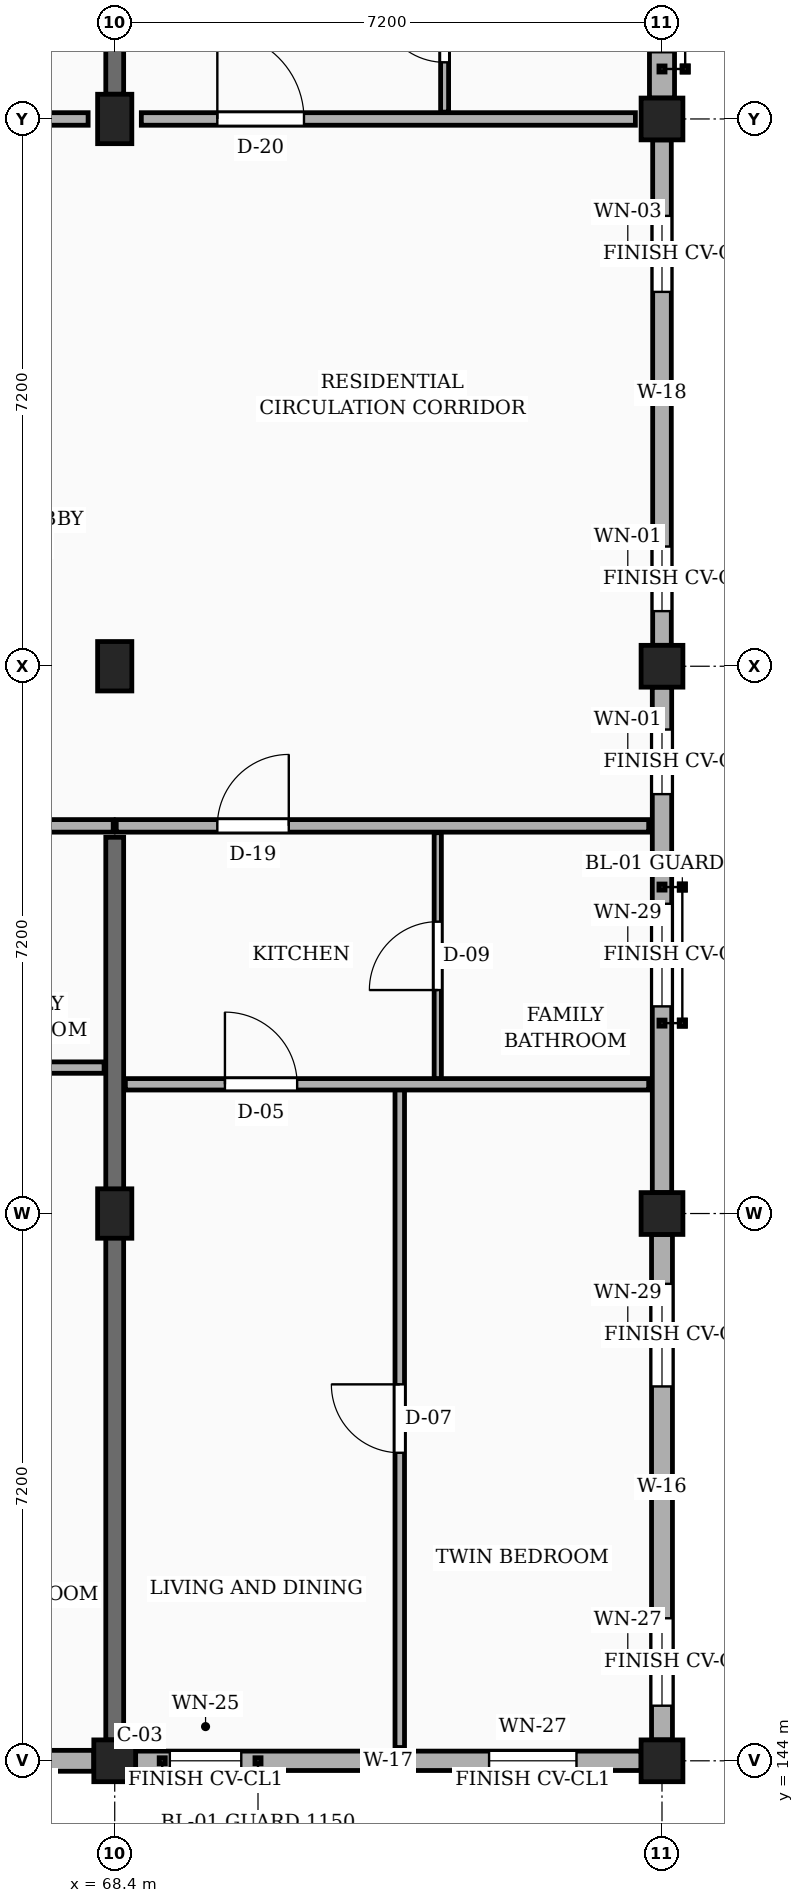
"""IFC4 building model, lengths in metres.
Left out: names, types, materials, properties, quantities, classifications, styles, units other than length and angle.
Written with IfcOpenShell. Run it as: python <this file> out.ifc"""

import sys

from ifc_helpers import new_model, si_unit, direction, frame, frame_2d, origin, origin_2d, place, context, subcontext, project, spatial, rectangle, extrude, element, fill, save


model = new_model("IFC4")
c1 = context("Model", 3, precision=1e-05, world=origin(), true_north=direction((0.0, 1.0)))
c2 = subcontext(c1, "Body", "Model", "MODEL_VIEW")
j1 = project(units=[si_unit("LENGTHUNIT", "METRE"), si_unit("PLANEANGLEUNIT", "RADIAN")], contexts=[c1])
p1 = place(None, origin())
s1 = spatial("IfcSite", under=j1, at=p1, CompositionType="ELEMENT")
p2 = place(p1, origin())
s2 = spatial("IfcBuilding", under=s1, at=p2, CompositionType="ELEMENT")
p3 = place(p2, frame((0.0, 0.0, 13.95)))
s3 = spatial("IfcBuildingStorey", under=s2, at=p3, CompositionType="ELEMENT", Elevation=13.95)
p4 = place(p3, frame((68.4, 144.0, 0.0), z_axis=(0.0, 0.0, 1.0), x_axis=(1.0, 0.0, 0.0)))
e1 = element("IfcColumn", 1, at=p4, inside=s3, PredefinedType="COLUMN", context=c2, shape_type="SweptSolid", body=[
    extrude(rectangle(XDim=0.55, YDim=0.55, at=origin_2d()), origin(), (0.0, 0.0, 1.0), 3.15),
])
for number, where, z_axis, x_axis in (
    (2, (68.4, 151.2, 0.0), (0.0, 0.0, 1.0), (1.0, 0.0, 0.0)),
    (3, (68.4, 158.4, 0.0), (0.0, 0.0, 1.0), (1.0, 0.0, 0.0)),
    (4, (68.4, 165.6, 0.0), (0.0, 0.0, 1.0), (1.0, 0.0, 0.0)),
):
    element("IfcColumn", number, at=place(p3, frame(where, z_axis=z_axis, x_axis=x_axis)), inside=s3, PredefinedType="COLUMN", context=c2, shape_type="SweptSolid", body=[
        extrude(rectangle(XDim=0.45, YDim=0.65, at=origin_2d()), origin(), (0.0, 0.0, 1.0), 3.15),
    ])
for number, where, z_axis, x_axis in (
    (5, (75.6, 144.0, 0.0), (0.0, 0.0, 1.0), (1.0, 0.0, 0.0)),
    (6, (75.6, 151.2, 0.0), (0.0, 0.0, 1.0), (1.0, 0.0, 0.0)),
    (7, (75.6, 158.4, 0.0), (0.0, 0.0, 1.0), (1.0, 0.0, 0.0)),
    (8, (75.6, 165.6, 0.0), (0.0, 0.0, 1.0), (1.0, 0.0, 0.0)),
):
    element("IfcColumn", number, at=place(p3, frame(where, z_axis=z_axis, x_axis=x_axis)), inside=s3, PredefinedType="COLUMN", context=c2, shape_type="SweptSolid", body=[
        extrude(rectangle(XDim=0.55, YDim=0.55, at=origin_2d()), origin(), (0.0, 0.0, 1.0), 3.15),
    ])
p5 = place(p3, frame((68.4, 144.275, 0.0), z_axis=(0.0, 0.0, 1.0), x_axis=(0.0, 1.0, 0.0)))
e9 = element("IfcWall", 9, at=p5, inside=s3, PredefinedType="SOLIDWALL", context=c2, shape_type="SweptSolid", body=[
    extrude(rectangle(XDim=11.875, YDim=0.235, at=frame_2d((5.938, 0.0))), origin(), (0.0, 0.0, 1.0), 2.185),
])
p6 = place(p3, frame((68.4, 165.925, 0.0), z_axis=(0.0, 0.0, 1.0), x_axis=(0.0, 1.0, 0.0)))
e10 = element("IfcWall", 10, at=p6, inside=s3, PredefinedType="SOLIDWALL", context=c2, shape_type="SweptSolid", body=[
    extrude(rectangle(XDim=6.6, YDim=0.235, at=frame_2d((3.3, 0.0))), origin(), (0.0, 0.0, 1.0), 2.185),
])
p7 = place(p3, frame((61.475, 144.0, 0.0), z_axis=(0.0, 0.0, 1.0), x_axis=(1.0, 0.0, 0.0)))
e11 = element("IfcWall", 11, at=p7, inside=s3, PredefinedType="SOLIDWALL", context=c2, shape_type="SweptSolid", body=[
    extrude(rectangle(XDim=6.65, YDim=0.275, at=frame_2d((3.325, 0.0))), origin(), (0.0, 0.0, 1.0), 2.455),
])
p8 = place(p7, frame((0.45, 0.0, 0.78)))
e12 = element("IfcOpeningElement", 12, at=p8, cuts=e11, PredefinedType="OPENING", context=c2, shape_type="SweptSolid", body=[
    extrude(rectangle(XDim=1.38, YDim=1.36, at=frame_2d((0.69, 0.68))), frame((0.0, 0.147, 0.0), z_axis=(0.0, -1.0, 0.0), x_axis=(1.0, 0.0, 0.0)), (0.0, 0.0, 1.0), 0.295),
])
p9 = place(p7, frame((4.65, 0.0, 0.78)))
e13 = element("IfcOpeningElement", 13, at=p9, cuts=e11, PredefinedType="OPENING", context=c2, shape_type="SweptSolid", body=[
    extrude(rectangle(XDim=0.94, YDim=1.44, at=frame_2d((0.47, 0.72))), frame((0.0, 0.147, 0.0), z_axis=(0.0, -1.0, 0.0), x_axis=(1.0, 0.0, 0.0)), (0.0, 0.0, 1.0), 0.295),
])
p10 = place(p3, frame((68.675, 144.0, 0.0), z_axis=(0.0, 0.0, 1.0), x_axis=(1.0, 0.0, 0.0)))
e14 = element("IfcWall", 14, at=p10, inside=s3, PredefinedType="SOLIDWALL", context=c2, shape_type="SweptSolid", body=[
    extrude(rectangle(XDim=6.65, YDim=0.255, at=frame_2d((3.325, 0.0))), origin(), (0.0, 0.0, 1.0), 2.455),
])
p11 = place(p10, frame((0.45, 0.0, 0.78)))
e15 = element("IfcOpeningElement", 15, at=p11, cuts=e14, PredefinedType="OPENING", context=c2, shape_type="SweptSolid", body=[
    extrude(rectangle(XDim=0.94, YDim=1.44, at=frame_2d((0.47, 0.72))), frame((0.0, 0.137, 0.0), z_axis=(0.0, -1.0, 0.0), x_axis=(1.0, 0.0, 0.0)), (0.0, 0.0, 1.0), 0.275),
])
p12 = place(p10, frame((4.65, 0.0, 0.78)))
e16 = element("IfcOpeningElement", 16, at=p12, cuts=e14, PredefinedType="OPENING", context=c2, shape_type="SweptSolid", body=[
    extrude(rectangle(XDim=1.15, YDim=1.44, at=frame_2d((0.575, 0.72))), frame((0.0, 0.137, 0.0), z_axis=(0.0, -1.0, 0.0), x_axis=(1.0, 0.0, 0.0)), (0.0, 0.0, 1.0), 0.275),
])
p13 = place(p3, frame((75.6, 144.275, 0.0), z_axis=(0.0, 0.0, 1.0), x_axis=(0.0, 1.0, 0.0)))
e17 = element("IfcWall", 17, at=p13, inside=s3, PredefinedType="SOLIDWALL", context=c2, shape_type="SweptSolid", body=[
    extrude(rectangle(XDim=6.65, YDim=0.275, at=frame_2d((3.325, 0.0))), origin(), (0.0, 0.0, 1.0), 2.455),
])
p14 = place(p13, frame((0.45, 0.0, 0.78)))
e18 = element("IfcOpeningElement", 18, at=p14, cuts=e17, PredefinedType="OPENING", context=c2, shape_type="SweptSolid", body=[
    extrude(rectangle(XDim=1.15, YDim=1.44, at=frame_2d((0.575, 0.72))), frame((0.0, 0.147, 0.0), z_axis=(0.0, -1.0, 0.0), x_axis=(1.0, 0.0, 0.0)), (0.0, 0.0, 1.0), 0.295),
])
p15 = place(p13, frame((4.65, 0.0, 0.78)))
e19 = element("IfcOpeningElement", 19, at=p15, cuts=e17, PredefinedType="OPENING", context=c2, shape_type="SweptSolid", body=[
    extrude(rectangle(XDim=1.35, YDim=1.44, at=frame_2d((0.675, 0.72))), frame((0.0, 0.147, 0.0), z_axis=(0.0, -1.0, 0.0), x_axis=(1.0, 0.0, 0.0)), (0.0, 0.0, 1.0), 0.295),
])
p16 = place(p3, frame((75.6, 151.475, 0.0), z_axis=(0.0, 0.0, 1.0), x_axis=(0.0, 1.0, 0.0)))
e20 = element("IfcWall", 20, at=p16, inside=s3, PredefinedType="SOLIDWALL", context=c2, shape_type="SweptSolid", body=[
    extrude(rectangle(XDim=6.65, YDim=0.255, at=frame_2d((3.325, 0.0))), origin(), (0.0, 0.0, 1.0), 2.455),
])
p17 = place(p16, frame((2.45, 0.0, 0.78)))
e21 = element("IfcOpeningElement", 21, at=p17, cuts=e20, PredefinedType="OPENING", context=c2, shape_type="SweptSolid", body=[
    extrude(rectangle(XDim=1.35, YDim=1.44, at=frame_2d((0.675, 0.72))), frame((0.0, 0.137, 0.0), z_axis=(0.0, -1.0, 0.0), x_axis=(1.0, 0.0, 0.0)), (0.0, 0.0, 1.0), 0.275),
])
p18 = place(p16, frame((5.242, 0.0, 0.78)))
e22 = element("IfcOpeningElement", 22, at=p18, cuts=e20, PredefinedType="OPENING", context=c2, shape_type="SweptSolid", body=[
    extrude(rectangle(XDim=0.85, YDim=1.15, at=frame_2d((0.425, 0.575))), frame((0.0, 0.137, 0.0), z_axis=(0.0, -1.0, 0.0), x_axis=(1.0, 0.0, 0.0)), (0.0, 0.0, 1.0), 0.275),
])
p19 = place(p3, frame((75.6, 158.675, 0.0), z_axis=(0.0, 0.0, 1.0), x_axis=(0.0, 1.0, 0.0)))
e23 = element("IfcWall", 23, at=p19, inside=s3, PredefinedType="SOLIDWALL", context=c2, shape_type="SweptSolid", body=[
    extrude(rectangle(XDim=6.65, YDim=0.245, at=frame_2d((3.325, 0.0))), origin(), (0.0, 0.0, 1.0), 2.455),
])
p20 = place(p19, frame((0.45, 0.0, 0.78)))
e24 = element("IfcOpeningElement", 24, at=p20, cuts=e23, PredefinedType="OPENING", context=c2, shape_type="SweptSolid", body=[
    extrude(rectangle(XDim=0.85, YDim=1.15, at=frame_2d((0.425, 0.575))), frame((0.0, 0.133, 0.0), z_axis=(0.0, -1.0, 0.0), x_axis=(1.0, 0.0, 0.0)), (0.0, 0.0, 1.0), 0.265),
])
p21 = place(p19, frame((4.65, 0.0, 0.78)))
e25 = element("IfcOpeningElement", 25, at=p21, cuts=e23, PredefinedType="OPENING", context=c2, shape_type="SweptSolid", body=[
    extrude(rectangle(XDim=1.0, YDim=1.15, at=frame_2d((0.5, 0.575))), frame((0.0, 0.133, 0.0), z_axis=(0.0, -1.0, 0.0), x_axis=(1.0, 0.0, 0.0)), (0.0, 0.0, 1.0), 0.265),
])
p22 = place(p3, frame((75.6, 165.875, 0.0), z_axis=(0.0, 0.0, 1.0), x_axis=(0.0, 1.0, 0.0)))
e26 = element("IfcWall", 26, at=p22, inside=s3, PredefinedType="SOLIDWALL", context=c2, shape_type="SweptSolid", body=[
    extrude(rectangle(XDim=6.65, YDim=0.33, at=frame_2d((3.325, 0.0))), origin(), (0.0, 0.0, 1.0), 2.455),
])
p23 = place(p22, frame((0.603, 0.0, 0.78)))
e27 = element("IfcOpeningElement", 27, at=p23, cuts=e26, PredefinedType="OPENING", context=c2, shape_type="SweptSolid", body=[
    extrude(rectangle(XDim=1.0, YDim=1.15, at=frame_2d((0.5, 0.575))), frame((0.0, 0.175, 0.0), z_axis=(0.0, -1.0, 0.0), x_axis=(1.0, 0.0, 0.0)), (0.0, 0.0, 1.0), 0.35),
])
p24 = place(p22, frame((3.708, 0.0, 0.78)))
e28 = element("IfcOpeningElement", 28, at=p24, cuts=e26, PredefinedType="OPENING", context=c2, shape_type="SweptSolid", body=[
    extrude(rectangle(XDim=1.16, YDim=1.15, at=frame_2d((0.58, 0.575))), frame((0.0, 0.175, 0.0), z_axis=(0.0, -1.0, 0.0), x_axis=(1.0, 0.0, 0.0)), (0.0, 0.0, 1.0), 0.35),
])
p25 = place(p3, frame((61.22, 156.3, 0.0), z_axis=(0.0, 0.0, 1.0), x_axis=(1.0, 0.0, 0.0)))
e29 = element("IfcWall", 29, at=p25, inside=s3, PredefinedType="PARTITIONING", context=c2, shape_type="SweptSolid", body=[
    extrude(rectangle(XDim=7.16, YDim=0.165, at=frame_2d((3.58, 0.0))), origin(), (0.0, 0.0, 1.0), 2.32),
])
p26 = place(p25, frame((1.33, 0.0, 0.0)))
e30 = element("IfcOpeningElement", 30, at=p26, cuts=e29, PredefinedType="OPENING", context=c2, shape_type="SweptSolid", body=[
    extrude(rectangle(XDim=1.0, YDim=2.15, at=frame_2d((0.5, 1.075))), frame((0.0, 0.093, 0.0), z_axis=(0.0, -1.0, 0.0), x_axis=(1.0, 0.0, 0.0)), (0.0, 0.0, 1.0), 0.185),
])
p27 = place(p3, frame((68.42, 156.3, 0.0), z_axis=(0.0, 0.0, 1.0), x_axis=(1.0, 0.0, 0.0)))
e31 = element("IfcWall", 31, at=p27, inside=s3, PredefinedType="PARTITIONING", context=c2, shape_type="SweptSolid", body=[
    extrude(rectangle(XDim=7.005, YDim=0.165, at=frame_2d((3.502, 0.0))), origin(), (0.0, 0.0, 1.0), 2.32),
])
p28 = place(p27, frame((1.33, 0.0, 0.0)))
e32 = element("IfcOpeningElement", 32, at=p28, cuts=e31, PredefinedType="OPENING", context=c2, shape_type="SweptSolid", body=[
    extrude(rectangle(XDim=0.94, YDim=2.12, at=frame_2d((0.47, 1.06))), frame((0.0, 0.093, 0.0), z_axis=(0.0, -1.0, 0.0), x_axis=(1.0, 0.0, 0.0)), (0.0, 0.0, 1.0), 0.185),
])
p29 = place(p3, frame((61.55, 165.6, 0.0), z_axis=(0.0, 0.0, 1.0), x_axis=(1.0, 0.0, 0.0)))
e33 = element("IfcWall", 33, at=p29, inside=s3, PredefinedType="PARTITIONING", context=c2, shape_type="SweptSolid", body=[
    extrude(rectangle(XDim=6.5, YDim=0.165, at=frame_2d((3.25, 0.0))), origin(), (0.0, 0.0, 1.0), 2.235),
])
p30 = place(p29, frame((1.0, 0.0, 0.0)))
e34 = element("IfcOpeningElement", 34, at=p30, cuts=e33, PredefinedType="OPENING", context=c2, shape_type="SweptSolid", body=[
    extrude(rectangle(XDim=0.94, YDim=2.12, at=frame_2d((0.47, 1.06))), frame((0.0, 0.093, 0.0), z_axis=(0.0, -1.0, 0.0), x_axis=(1.0, 0.0, 0.0)), (0.0, 0.0, 1.0), 0.185),
])
p31 = place(p3, frame((68.75, 165.6, 0.0), z_axis=(0.0, 0.0, 1.0), x_axis=(1.0, 0.0, 0.0)))
e35 = element("IfcWall", 35, at=p31, inside=s3, PredefinedType="PARTITIONING", context=c2, shape_type="SweptSolid", body=[
    extrude(rectangle(XDim=6.5, YDim=0.165, at=frame_2d((3.25, 0.0))), origin(), (0.0, 0.0, 1.0), 2.235),
])
p32 = place(p31, frame((1.0, 0.0, 0.0)))
e36 = element("IfcOpeningElement", 36, at=p32, cuts=e35, PredefinedType="OPENING", context=c2, shape_type="SweptSolid", body=[
    extrude(rectangle(XDim=1.14, YDim=2.18, at=frame_2d((0.57, 1.09))), frame((0.0, 0.093, 0.0), z_axis=(0.0, -1.0, 0.0), x_axis=(1.0, 0.0, 0.0)), (0.0, 0.0, 1.0), 0.185),
])
p33 = place(p3, frame((61.34, 153.12, 0.0), z_axis=(0.0, 0.0, 1.0), x_axis=(1.0, 0.0, 0.0)))
e37 = element("IfcWall", 37, at=p33, inside=s3, PredefinedType="PARTITIONING", context=c2, shape_type="SweptSolid", body=[
    extrude(rectangle(XDim=6.92, YDim=0.15, at=frame_2d((3.46, 0.0))), origin(), (0.0, 0.0, 1.0), 2.32),
])
p34 = place(p33, frame((1.31, 0.0, 0.0)))
e38 = element("IfcOpeningElement", 38, at=p34, cuts=e37, PredefinedType="OPENING", context=c2, shape_type="SweptSolid", body=[
    extrude(rectangle(XDim=0.92, YDim=2.1, at=frame_2d((0.46, 1.05))), frame((0.0, 0.085, 0.0), z_axis=(0.0, -1.0, 0.0), x_axis=(1.0, 0.0, 0.0)), (0.0, 0.0, 1.0), 0.17),
])
p35 = place(p3, frame((72.15, 144.175, 0.0), z_axis=(0.0, 0.0, 1.0), x_axis=(0.0, 1.0, 0.0)))
e39 = element("IfcWall", 39, at=p35, inside=s3, PredefinedType="PARTITIONING", context=c2, shape_type="SweptSolid", body=[
    extrude(rectangle(XDim=8.655, YDim=0.125, at=frame_2d((4.328, 0.0))), origin(), (0.0, 0.0, 1.0), 2.32),
])
p36 = place(p35, frame((3.877, 0.0, 0.0)))
e40 = element("IfcOpeningElement", 40, at=p36, cuts=e39, PredefinedType="OPENING", context=c2, shape_type="SweptSolid", body=[
    extrude(rectangle(XDim=0.9, YDim=2.1, at=frame_2d((0.45, 1.05))), frame((0.0, 0.073, 0.0), z_axis=(0.0, -1.0, 0.0), x_axis=(1.0, 0.0, 0.0)), (0.0, 0.0, 1.0), 0.145),
])
p37 = place(p3, frame((72.65, 152.97, 0.0), z_axis=(0.0, 0.0, 1.0), x_axis=(0.0, 1.0, 0.0)))
e41 = element("IfcWall", 41, at=p37, inside=s3, PredefinedType="PARTITIONING", context=c2, shape_type="SweptSolid", body=[
    extrude(rectangle(XDim=3.24, YDim=0.095, at=frame_2d((1.62, 0.0))), origin(), (0.0, 0.0, 1.0), 2.32),
])
p38 = place(p37, frame((1.17, 0.0, 0.0)))
e42 = element("IfcOpeningElement", 42, at=p38, cuts=e41, PredefinedType="OPENING", context=c2, shape_type="SweptSolid", body=[
    extrude(rectangle(XDim=0.9, YDim=2.05, at=frame_2d((0.45, 1.025))), frame((0.0, 0.058, 0.0), z_axis=(0.0, -1.0, 0.0), x_axis=(1.0, 0.0, 0.0)), (0.0, 0.0, 1.0), 0.115),
])
p39 = place(p3, frame((68.54, 152.9, 0.0), z_axis=(0.0, 0.0, 1.0), x_axis=(1.0, 0.0, 0.0)))
e43 = element("IfcWall", 43, at=p39, inside=s3, PredefinedType="PARTITIONING", context=c2, shape_type="SweptSolid", body=[
    extrude(rectangle(XDim=6.885, YDim=0.15, at=frame_2d((3.442, 0.0))), origin(), (0.0, 0.0, 1.0), 2.32),
])
p40 = place(p39, frame((1.31, 0.0, 0.0)))
e44 = element("IfcOpeningElement", 44, at=p40, cuts=e43, PredefinedType="OPENING", context=c2, shape_type="SweptSolid", body=[
    extrude(rectangle(XDim=0.95, YDim=2.1, at=frame_2d((0.475, 1.05))), frame((0.0, 0.085, 0.0), z_axis=(0.0, -1.0, 0.0), x_axis=(1.0, 0.0, 0.0)), (0.0, 0.0, 1.0), 0.17),
])
p41 = place(p3, frame((72.74, 165.69, 0.0), z_axis=(0.0, 0.0, 1.0), x_axis=(0.0, 1.0, 0.0)))
e45 = element("IfcWall", 45, at=p41, inside=s3, PredefinedType="PARTITIONING", context=c2, shape_type="SweptSolid", body=[
    extrude(rectangle(XDim=2.18, YDim=0.105, at=frame_2d((1.09, 0.0))), origin(), (0.0, 0.0, 1.0), 2.32),
])
p42 = place(p41, frame((0.655, 0.0, 0.0)))
e46 = element("IfcOpeningElement", 46, at=p42, cuts=e45, PredefinedType="OPENING", context=c2, shape_type="SweptSolid", body=[
    extrude(rectangle(XDim=0.87, YDim=2.05, at=frame_2d((0.435, 1.025))), frame((0.0, 0.062, 0.0), z_axis=(0.0, -1.0, 0.0), x_axis=(1.0, 0.0, 0.0)), (0.0, 0.0, 1.0), 0.125),
])
p43 = place(p11, origin())
e47 = element("IfcWindow", 47, at=p43, inside=s3, PartitioningType="SINGLE_PANEL", PredefinedType="WINDOW", context=c2, shape_type="SweptSolid", body=[
    extrude(rectangle(XDim=0.94, YDim=1.44, at=frame_2d((0.47, 0.72))), frame((0.0, 0.03, 0.0), z_axis=(0.0, -1.0, 0.0), x_axis=(1.0, 0.0, 0.0)), (0.0, 0.0, 1.0), 0.06),
])
fill(e15, e47)
p44 = place(p12, origin())
e48 = element("IfcWindow", 48, at=p44, inside=s3, PartitioningType="SINGLE_PANEL", PredefinedType="WINDOW", context=c2, shape_type="SweptSolid", body=[
    extrude(rectangle(XDim=1.15, YDim=1.44, at=frame_2d((0.575, 0.72))), frame((0.0, 0.03, 0.0), z_axis=(0.0, -1.0, 0.0), x_axis=(1.0, 0.0, 0.0)), (0.0, 0.0, 1.0), 0.06),
])
fill(e16, e48)
p45 = place(p14, origin())
e49 = element("IfcWindow", 49, at=p45, inside=s3, PartitioningType="SINGLE_PANEL", PredefinedType="WINDOW", context=c2, shape_type="SweptSolid", body=[
    extrude(rectangle(XDim=1.15, YDim=1.44, at=frame_2d((0.575, 0.72))), frame((0.0, 0.03, 0.0), z_axis=(0.0, -1.0, 0.0), x_axis=(1.0, 0.0, 0.0)), (0.0, 0.0, 1.0), 0.06),
])
fill(e18, e49)
p46 = place(p15, origin())
e50 = element("IfcWindow", 50, at=p46, inside=s3, PartitioningType="SINGLE_PANEL", PredefinedType="WINDOW", context=c2, shape_type="SweptSolid", body=[
    extrude(rectangle(XDim=1.35, YDim=1.44, at=frame_2d((0.675, 0.72))), frame((0.0, 0.03, 0.0), z_axis=(0.0, -1.0, 0.0), x_axis=(1.0, 0.0, 0.0)), (0.0, 0.0, 1.0), 0.06),
])
fill(e19, e50)
p47 = place(p17, origin())
e51 = element("IfcWindow", 51, at=p47, inside=s3, PartitioningType="SINGLE_PANEL", PredefinedType="WINDOW", context=c2, shape_type="SweptSolid", body=[
    extrude(rectangle(XDim=1.35, YDim=1.44, at=frame_2d((0.675, 0.72))), frame((0.0, 0.03, 0.0), z_axis=(0.0, -1.0, 0.0), x_axis=(1.0, 0.0, 0.0)), (0.0, 0.0, 1.0), 0.06),
])
fill(e21, e51)
p48 = place(p18, origin())
e52 = element("IfcWindow", 52, at=p48, inside=s3, PartitioningType="SINGLE_PANEL", PredefinedType="WINDOW", context=c2, shape_type="SweptSolid", body=[
    extrude(rectangle(XDim=0.85, YDim=1.15, at=frame_2d((0.425, 0.575))), frame((0.0, 0.03, 0.0), z_axis=(0.0, -1.0, 0.0), x_axis=(1.0, 0.0, 0.0)), (0.0, 0.0, 1.0), 0.06),
])
fill(e22, e52)
p49 = place(p20, origin())
e53 = element("IfcWindow", 53, at=p49, inside=s3, PartitioningType="SINGLE_PANEL", PredefinedType="WINDOW", context=c2, shape_type="SweptSolid", body=[
    extrude(rectangle(XDim=0.85, YDim=1.15, at=frame_2d((0.425, 0.575))), frame((0.0, 0.03, 0.0), z_axis=(0.0, -1.0, 0.0), x_axis=(1.0, 0.0, 0.0)), (0.0, 0.0, 1.0), 0.06),
])
fill(e24, e53)
p50 = place(p21, origin())
e54 = element("IfcWindow", 54, at=p50, inside=s3, PartitioningType="SINGLE_PANEL", PredefinedType="WINDOW", context=c2, shape_type="SweptSolid", body=[
    extrude(rectangle(XDim=1.0, YDim=1.15, at=frame_2d((0.5, 0.575))), frame((0.0, 0.03, 0.0), z_axis=(0.0, -1.0, 0.0), x_axis=(1.0, 0.0, 0.0)), (0.0, 0.0, 1.0), 0.06),
])
fill(e25, e54)
p51 = place(p23, origin())
e55 = element("IfcWindow", 55, at=p51, inside=s3, PartitioningType="SINGLE_PANEL", PredefinedType="WINDOW", context=c2, shape_type="SweptSolid", body=[
    extrude(rectangle(XDim=1.0, YDim=1.15, at=frame_2d((0.5, 0.575))), frame((0.0, 0.03, 0.0), z_axis=(0.0, -1.0, 0.0), x_axis=(1.0, 0.0, 0.0)), (0.0, 0.0, 1.0), 0.06),
])
fill(e27, e55)
p52 = place(p28, origin())
e56 = element("IfcDoor", 56, at=p52, inside=s3, OperationType="SINGLE_SWING_RIGHT", PredefinedType="DOOR", context=c2, shape_type="SweptSolid", body=[
    extrude(rectangle(XDim=0.94, YDim=2.12, at=frame_2d((0.47, 1.06))), frame((0.0, 0.025, 0.0), z_axis=(0.0, -1.0, 0.0), x_axis=(1.0, 0.0, 0.0)), (0.0, 0.0, 1.0), 0.05),
])
fill(e32, e56)
p53 = place(p32, origin())
e57 = element("IfcDoor", 57, at=p53, inside=s3, OperationType="SINGLE_SWING_LEFT", PredefinedType="DOOR", context=c2, shape_type="SweptSolid", body=[
    extrude(rectangle(XDim=1.14, YDim=2.18, at=frame_2d((0.57, 1.09))), frame((0.0, 0.025, 0.0), z_axis=(0.0, -1.0, 0.0), x_axis=(1.0, 0.0, 0.0)), (0.0, 0.0, 1.0), 0.05),
])
fill(e36, e57)
p54 = place(p36, origin())
e58 = element("IfcDoor", 58, at=p54, inside=s3, OperationType="SINGLE_SWING_RIGHT", PredefinedType="DOOR", context=c2, shape_type="SweptSolid", body=[
    extrude(rectangle(XDim=0.9, YDim=2.1, at=frame_2d((0.45, 1.05))), frame((0.0, 0.025, 0.0), z_axis=(0.0, -1.0, 0.0), x_axis=(1.0, 0.0, 0.0)), (0.0, 0.0, 1.0), 0.05),
])
fill(e40, e58)
p55 = place(p38, origin())
e59 = element("IfcDoor", 59, at=p55, inside=s3, OperationType="SINGLE_SWING_LEFT", PredefinedType="DOOR", context=c2, shape_type="SweptSolid", body=[
    extrude(rectangle(XDim=0.9, YDim=2.05, at=frame_2d((0.45, 1.025))), frame((0.0, 0.025, 0.0), z_axis=(0.0, -1.0, 0.0), x_axis=(1.0, 0.0, 0.0)), (0.0, 0.0, 1.0), 0.05),
])
fill(e42, e59)
p56 = place(p40, origin())
e60 = element("IfcDoor", 60, at=p56, inside=s3, OperationType="SINGLE_SWING_LEFT", PredefinedType="DOOR", context=c2, shape_type="SweptSolid", body=[
    extrude(rectangle(XDim=0.95, YDim=2.1, at=frame_2d((0.475, 1.05))), frame((0.0, 0.025, 0.0), z_axis=(0.0, -1.0, 0.0), x_axis=(1.0, 0.0, 0.0)), (0.0, 0.0, 1.0), 0.05),
])
fill(e44, e60)
p57 = place(p42, origin())
e61 = element("IfcDoor", 61, at=p57, inside=s3, OperationType="SINGLE_SWING_RIGHT", PredefinedType="DOOR", context=c2, shape_type="SweptSolid", body=[
    extrude(rectangle(XDim=0.87, YDim=2.05, at=frame_2d((0.435, 1.025))), frame((0.0, 0.025, 0.0), z_axis=(0.0, -1.0, 0.0), x_axis=(1.0, 0.0, 0.0)), (0.0, 0.0, 1.0), 0.05),
])
fill(e46, e61)
save(model, sys.argv[1])
